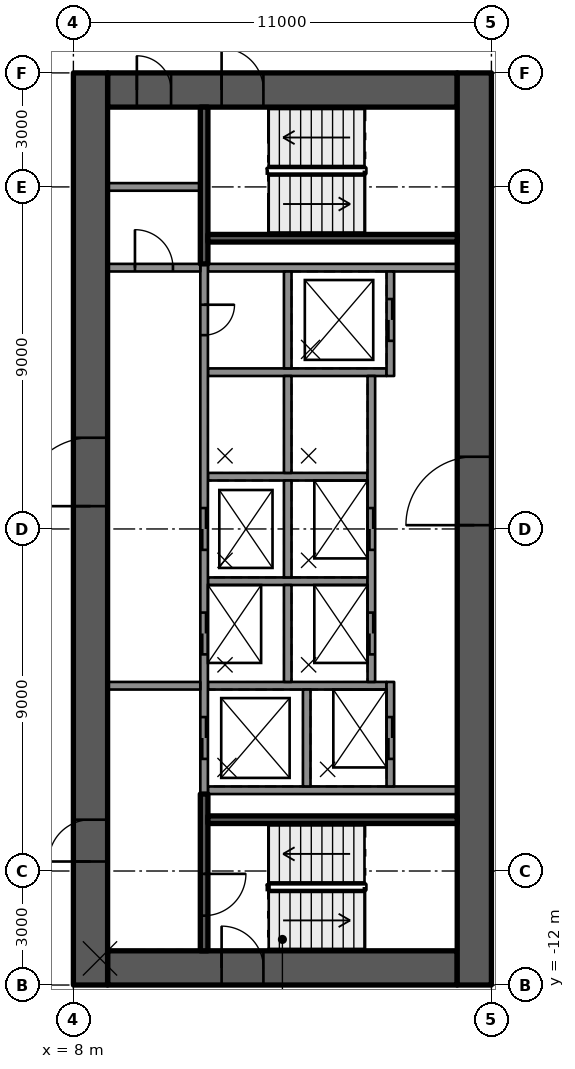
"""IFC4 building model, lengths in metres.
Left out: names, types, materials, properties, quantities, classifications, styles, units other than length and angle.
Written with IfcOpenShell. Run it as: python <this file> out.ifc"""

import sys

from ifc_helpers import new_model, si_unit, direction, frame, frame_2d, origin, place, context, subcontext, project, spatial, rectangle, extrude, element, fill, save


model = new_model("IFC4")
c1 = context("Model", 3, precision=1e-05, world=origin(), true_north=direction((0.0, 1.0)))
c2 = subcontext(c1, "Body", "Model", "MODEL_VIEW")
j1 = project(units=[si_unit("LENGTHUNIT", "METRE"), si_unit("PLANEANGLEUNIT", "RADIAN")], contexts=[c1])
p1 = place(None, origin())
s1 = spatial("IfcSite", under=j1, at=p1, CompositionType="ELEMENT")
p2 = place(p1, origin())
s2 = spatial("IfcBuilding", under=s1, at=p2, CompositionType="ELEMENT")
p3 = place(p2, frame((0.0, 0.0, 127.2)))
s3 = spatial("IfcBuildingStorey", under=s2, at=p3, CompositionType="ELEMENT", Elevation=127.2)
p4 = place(p3, frame((8.9, 11.55, 0.0), z_axis=(0.0, 0.0, 1.0), x_axis=(1.0, 0.0, 0.0)))
e1 = element("IfcWall", 1, at=p4, inside=s3, PredefinedType="SHEAR", context=c2, shape_type="SweptSolid", body=[
    extrude(rectangle(XDim=9.2, YDim=0.9, at=frame_2d((4.6, 0.0))), origin(), (0.0, 0.0, 1.0), 3.5),
])
p5 = place(p4, frame((3.0, 0.0, 0.0)))
e2 = element("IfcOpeningElement", 2, at=p5, cuts=e1, PredefinedType="OPENING", context=c2, shape_type="SweptSolid", body=[
    extrude(rectangle(XDim=1.1, YDim=2.1, at=frame_2d((0.55, 1.05))), frame((0.0, 0.46, 0.0), z_axis=(0.0, -1.0, 0.0), x_axis=(1.0, 0.0, 0.0)), (0.0, 0.0, 1.0), 0.92),
])
p6 = place(p4, frame((0.77, 0.0, 0.0)))
e3 = element("IfcOpeningElement", 3, at=p6, cuts=e1, PredefinedType="OPENING", context=c2, shape_type="SweptSolid", body=[
    extrude(rectangle(XDim=0.9, YDim=2.1, at=frame_2d((0.45, 1.05))), frame((0.0, 0.46, 0.0), z_axis=(0.0, -1.0, 0.0), x_axis=(1.0, 0.0, 0.0)), (0.0, 0.0, 1.0), 0.92),
])
p7 = place(p3, frame((8.9, -11.55, 0.0), z_axis=(0.0, 0.0, 1.0), x_axis=(1.0, 0.0, 0.0)))
e4 = element("IfcWall", 4, at=p7, inside=s3, PredefinedType="SHEAR", context=c2, shape_type="SweptSolid", body=[
    extrude(rectangle(XDim=9.2, YDim=0.9, at=frame_2d((4.6, 0.0))), origin(), (0.0, 0.0, 1.0), 3.5),
])
p8 = place(p7, frame((3.0, 0.0, 0.0)))
e5 = element("IfcOpeningElement", 5, at=p8, cuts=e4, PredefinedType="OPENING", context=c2, shape_type="SweptSolid", body=[
    extrude(rectangle(XDim=1.1, YDim=2.1, at=frame_2d((0.55, 1.05))), frame((0.0, 0.46, 0.0), z_axis=(0.0, -1.0, 0.0), x_axis=(1.0, 0.0, 0.0)), (0.0, 0.0, 1.0), 0.92),
])
p9 = place(p3, frame((8.45, -12.0, 0.0), z_axis=(0.0, 0.0, 1.0), x_axis=(0.0, 1.0, 0.0)))
e6 = element("IfcWall", 6, at=p9, inside=s3, PredefinedType="SHEAR", context=c2, shape_type="SweptSolid", body=[
    extrude(rectangle(XDim=24.0, YDim=0.9, at=frame_2d((12.0, 0.0))), origin(), (0.0, 0.0, 1.0), 3.5),
])
p10 = place(p9, frame((12.6, 0.0, 0.0)))
e7 = element("IfcOpeningElement", 7, at=p10, cuts=e6, PredefinedType="OPENING", context=c2, shape_type="SweptSolid", body=[
    extrude(rectangle(XDim=1.8, YDim=2.1, at=frame_2d((0.9, 1.05))), frame((0.0, 0.46, 0.0), z_axis=(0.0, -1.0, 0.0), x_axis=(1.0, 0.0, 0.0)), (0.0, 0.0, 1.0), 0.92),
])
p11 = place(p9, frame((3.25, 0.0, 0.0)))
e8 = element("IfcOpeningElement", 8, at=p11, cuts=e6, PredefinedType="OPENING", context=c2, shape_type="SweptSolid", body=[
    extrude(rectangle(XDim=1.1, YDim=2.1, at=frame_2d((0.55, 1.05))), frame((0.0, 0.46, 0.0), z_axis=(0.0, -1.0, 0.0), x_axis=(1.0, 0.0, 0.0)), (0.0, 0.0, 1.0), 0.92),
])
p12 = place(p3, frame((18.55, -12.0, 0.0), z_axis=(0.0, 0.0, 1.0), x_axis=(0.0, 1.0, 0.0)))
e9 = element("IfcWall", 9, at=p12, inside=s3, PredefinedType="SHEAR", context=c2, shape_type="SweptSolid", body=[
    extrude(rectangle(XDim=24.0, YDim=0.9, at=frame_2d((12.0, 0.0))), origin(), (0.0, 0.0, 1.0), 3.5),
])
p13 = place(p12, frame((12.1, 0.0, 0.0)))
e10 = element("IfcOpeningElement", 10, at=p13, cuts=e9, PredefinedType="OPENING", context=c2, shape_type="SweptSolid", body=[
    extrude(rectangle(XDim=1.8, YDim=2.1, at=frame_2d((0.9, 1.05))), frame((0.0, 0.46, 0.0), z_axis=(0.0, -1.0, 0.0), x_axis=(1.0, 0.0, 0.0)), (0.0, 0.0, 1.0), 0.92),
])
for number, where, z_axis, x_axis in (
    (11, (11.54, -6.875, 0.0), (0.0, 0.0, 1.0), (1.0, 0.0, 0.0)),
    (12, (11.54, 6.875, 0.0), (0.0, 0.0, 1.0), (1.0, 0.0, 0.0)),
):
    element("IfcWall", number, at=place(p3, frame(where, z_axis=z_axis, x_axis=x_axis)), inside=s3, PredefinedType="SOLIDWALL", context=c2, shape_type="SweptSolid", body=[
        extrude(rectangle(XDim=6.56, YDim=0.2, at=frame_2d((3.28, 0.0))), origin(), (0.0, 0.0, 1.0), 3.09),
    ])
p14 = place(p3, frame((11.54, 4.125, 0.0), z_axis=(0.0, 0.0, 1.0), x_axis=(1.0, 0.0, 0.0)))
e13 = element("IfcWall", 13, at=p14, inside=s3, PredefinedType="SOLIDWALL", context=c2, shape_type="SweptSolid", body=[
    extrude(rectangle(XDim=4.7, YDim=0.2, at=frame_2d((2.35, 0.0))), origin(), (0.0, 0.0, 1.0), 3.09),
])
for number, where, z_axis, x_axis in (
    (14, (11.54, 1.375, 0.0), (0.0, 0.0, 1.0), (1.0, 0.0, 0.0)),
    (15, (11.54, -1.375, 0.0), (0.0, 0.0, 1.0), (1.0, 0.0, 0.0)),
):
    element("IfcWall", number, at=place(p3, frame(where, z_axis=z_axis, x_axis=x_axis)), inside=s3, PredefinedType="SOLIDWALL", context=c2, shape_type="SweptSolid", body=[
        extrude(rectangle(XDim=4.2, YDim=0.2, at=frame_2d((2.1, 0.0))), origin(), (0.0, 0.0, 1.0), 3.09),
    ])
p15 = place(p3, frame((11.54, -4.125, 0.0), z_axis=(0.0, 0.0, 1.0), x_axis=(1.0, 0.0, 0.0)))
e16 = element("IfcWall", 16, at=p15, inside=s3, PredefinedType="SOLIDWALL", context=c2, shape_type="SweptSolid", body=[
    extrude(rectangle(XDim=4.7, YDim=0.2, at=frame_2d((2.35, 0.0))), origin(), (0.0, 0.0, 1.0), 3.09),
])
p16 = place(p3, frame((11.44, 6.975, 0.0), z_axis=(0.0, 0.0, 1.0), x_axis=(0.0, -1.0, 0.0)))
e17 = element("IfcWall", 17, at=p16, inside=s3, PredefinedType="SOLIDWALL", context=c2, shape_type="SweptSolid", body=[
    extrude(rectangle(XDim=13.95, YDim=0.2, at=frame_2d((6.975, 0.0))), origin(), (0.0, 0.0, 1.0), 3.09),
])
p17 = place(p16, frame((6.425, 0.0, 0.0)))
e18 = element("IfcOpeningElement", 18, at=p17, cuts=e17, PredefinedType="OPENING", context=c2, shape_type="SweptSolid", body=[
    extrude(rectangle(XDim=1.1, YDim=2.1, at=frame_2d((0.55, 1.05))), frame((0.0, 0.11, 0.0), z_axis=(0.0, -1.0, 0.0), x_axis=(1.0, 0.0, 0.0)), (0.0, 0.0, 1.0), 0.22),
])
p18 = place(p16, frame((9.175, 0.0, 0.0)))
e19 = element("IfcOpeningElement", 19, at=p18, cuts=e17, PredefinedType="OPENING", context=c2, shape_type="SweptSolid", body=[
    extrude(rectangle(XDim=1.1, YDim=2.1, at=frame_2d((0.55, 1.05))), frame((0.0, 0.11, 0.0), z_axis=(0.0, -1.0, 0.0), x_axis=(1.0, 0.0, 0.0)), (0.0, 0.0, 1.0), 0.22),
])
p19 = place(p16, frame((11.925, 0.0, 0.0)))
e20 = element("IfcOpeningElement", 20, at=p19, cuts=e17, PredefinedType="OPENING", context=c2, shape_type="SweptSolid", body=[
    extrude(rectangle(XDim=1.1, YDim=2.1, at=frame_2d((0.55, 1.05))), frame((0.0, 0.11, 0.0), z_axis=(0.0, -1.0, 0.0), x_axis=(1.0, 0.0, 0.0)), (0.0, 0.0, 1.0), 0.22),
])
p20 = place(p16, frame((1.075, 0.0, 0.0)))
e21 = element("IfcOpeningElement", 21, at=p20, cuts=e17, PredefinedType="OPENING", context=c2, shape_type="SweptSolid", body=[
    extrude(rectangle(XDim=0.8, YDim=2.1, at=frame_2d((0.4, 1.05))), frame((0.0, 0.11, 0.0), z_axis=(0.0, -1.0, 0.0), x_axis=(1.0, 0.0, 0.0)), (0.0, 0.0, 1.0), 0.22),
])
for number, where, z_axis, x_axis in (
    (22, (13.64, 6.775, 0.0), (0.0, 0.0, 1.0), (0.0, -1.0, 0.0)),
    (23, (13.64, 4.025, 0.0), (0.0, 0.0, 1.0), (0.0, -1.0, 0.0)),
    (24, (13.64, 1.275, 0.0), (0.0, 0.0, 1.0), (0.0, -1.0, 0.0)),
    (25, (13.64, -1.475, 0.0), (0.0, 0.0, 1.0), (0.0, -1.0, 0.0)),
    (26, (14.14, -4.225, 0.0), (0.0, 0.0, 1.0), (0.0, -1.0, 0.0)),
):
    element("IfcWall", number, at=place(p3, frame(where, z_axis=z_axis, x_axis=x_axis)), inside=s3, PredefinedType="SOLIDWALL", context=c2, shape_type="SweptSolid", body=[
        extrude(rectangle(XDim=2.55, YDim=0.2, at=frame_2d((1.275, 0.0))), origin(), (0.0, 0.0, 1.0), 3.09),
    ])
p21 = place(p3, frame((16.34, 6.775, 0.0), z_axis=(0.0, 0.0, 1.0), x_axis=(0.0, -1.0, 0.0)))
e27 = element("IfcWall", 27, at=p21, inside=s3, PredefinedType="SOLIDWALL", context=c2, shape_type="SweptSolid", body=[
    extrude(rectangle(XDim=2.75, YDim=0.2, at=frame_2d((1.375, 0.0))), origin(), (0.0, 0.0, 1.0), 3.09),
])
p22 = place(p21, frame((0.725, 0.0, 0.0)))
e28 = element("IfcOpeningElement", 28, at=p22, cuts=e27, PredefinedType="OPENING", context=c2, shape_type="SweptSolid", body=[
    extrude(rectangle(XDim=1.1, YDim=2.1, at=frame_2d((0.55, 1.05))), frame((0.0, 0.11, 0.0), z_axis=(0.0, -1.0, 0.0), x_axis=(1.0, 0.0, 0.0)), (0.0, 0.0, 1.0), 0.22),
])
p23 = place(p3, frame((15.84, 4.025, 0.0), z_axis=(0.0, 0.0, 1.0), x_axis=(0.0, -1.0, 0.0)))
e29 = element("IfcWall", 29, at=p23, inside=s3, PredefinedType="SOLIDWALL", context=c2, shape_type="SweptSolid", body=[
    extrude(rectangle(XDim=8.05, YDim=0.2, at=frame_2d((4.025, 0.0))), origin(), (0.0, 0.0, 1.0), 3.09),
])
p24 = place(p23, frame((3.475, 0.0, 0.0)))
e30 = element("IfcOpeningElement", 30, at=p24, cuts=e29, PredefinedType="OPENING", context=c2, shape_type="SweptSolid", body=[
    extrude(rectangle(XDim=1.1, YDim=2.1, at=frame_2d((0.55, 1.05))), frame((0.0, 0.11, 0.0), z_axis=(0.0, -1.0, 0.0), x_axis=(1.0, 0.0, 0.0)), (0.0, 0.0, 1.0), 0.22),
])
p25 = place(p23, frame((6.225, 0.0, 0.0)))
e31 = element("IfcOpeningElement", 31, at=p25, cuts=e29, PredefinedType="OPENING", context=c2, shape_type="SweptSolid", body=[
    extrude(rectangle(XDim=1.1, YDim=2.1, at=frame_2d((0.55, 1.05))), frame((0.0, 0.11, 0.0), z_axis=(0.0, -1.0, 0.0), x_axis=(1.0, 0.0, 0.0)), (0.0, 0.0, 1.0), 0.22),
])
p26 = place(p3, frame((16.34, -4.025, 0.0), z_axis=(0.0, 0.0, 1.0), x_axis=(0.0, -1.0, 0.0)))
e32 = element("IfcWall", 32, at=p26, inside=s3, PredefinedType="SOLIDWALL", context=c2, shape_type="SweptSolid", body=[
    extrude(rectangle(XDim=2.75, YDim=0.2, at=frame_2d((1.375, 0.0))), origin(), (0.0, 0.0, 1.0), 3.09),
])
p27 = place(p26, frame((0.925, 0.0, 0.0)))
e33 = element("IfcOpeningElement", 33, at=p27, cuts=e32, PredefinedType="OPENING", context=c2, shape_type="SweptSolid", body=[
    extrude(rectangle(XDim=1.1, YDim=2.1, at=frame_2d((0.55, 1.05))), frame((0.0, 0.11, 0.0), z_axis=(0.0, -1.0, 0.0), x_axis=(1.0, 0.0, 0.0)), (0.0, 0.0, 1.0), 0.22),
])
p28 = place(p3, frame((11.44, -6.975, 0.0), z_axis=(0.0, 0.0, 1.0), x_axis=(0.0, -1.0, 0.0)))
e34 = element("IfcWall", 34, at=p28, inside=s3, PredefinedType="SOLIDWALL", context=c2, shape_type="SweptSolid", body=[
    extrude(rectangle(XDim=4.125, YDim=0.2, at=frame_2d((2.062, 0.0))), origin(), (0.0, 0.0, 1.0), 3.09),
])
p29 = place(p28, frame((2.1, 0.0, 0.0)))
e35 = element("IfcOpeningElement", 35, at=p29, cuts=e34, PredefinedType="OPENING", context=c2, shape_type="SweptSolid", body=[
    extrude(rectangle(XDim=1.1, YDim=2.1, at=frame_2d((0.55, 1.05))), frame((0.0, 0.11, 0.0), z_axis=(0.0, -1.0, 0.0), x_axis=(1.0, 0.0, 0.0)), (0.0, 0.0, 1.0), 0.22),
])
p30 = place(p3, frame((11.54, -7.65, 0.0), z_axis=(0.0, 0.0, 1.0), x_axis=(1.0, 0.0, 0.0)))
e36 = element("IfcWall", 36, at=p30, inside=s3, PredefinedType="SOLIDWALL", context=c2, shape_type="SweptSolid", body=[
    extrude(rectangle(XDim=6.56, YDim=0.2, at=frame_2d((3.28, 0.0))), origin(), (0.0, 0.0, 1.0), 3.09),
])
p31 = place(p3, frame((11.44, 11.1, 0.0), z_axis=(0.0, 0.0, 1.0), x_axis=(0.0, -1.0, 0.0)))
e37 = element("IfcWall", 37, at=p31, inside=s3, PredefinedType="SOLIDWALL", context=c2, shape_type="SweptSolid", body=[
    extrude(rectangle(XDim=4.125, YDim=0.2, at=frame_2d((2.062, 0.0))), origin(), (0.0, 0.0, 1.0), 3.09),
])
p32 = place(p3, frame((11.54, 7.65, 0.0), z_axis=(0.0, 0.0, 1.0), x_axis=(1.0, 0.0, 0.0)))
e38 = element("IfcWall", 38, at=p32, inside=s3, PredefinedType="SOLIDWALL", context=c2, shape_type="SweptSolid", body=[
    extrude(rectangle(XDim=6.56, YDim=0.2, at=frame_2d((3.28, 0.0))), origin(), (0.0, 0.0, 1.0), 3.09),
])
p33 = place(p3, frame((8.9, -4.125, 0.0), z_axis=(0.0, 0.0, 1.0), x_axis=(1.0, 0.0, 0.0)))
e39 = element("IfcWall", 39, at=p33, inside=s3, PredefinedType="PARTITIONING", context=c2, shape_type="SweptSolid", body=[
    extrude(rectangle(XDim=2.44, YDim=0.2, at=frame_2d((1.22, 0.0))), origin(), (0.0, 0.0, 1.0), 3.09),
])
p34 = place(p3, frame((8.9, 6.875, 0.0), z_axis=(0.0, 0.0, 1.0), x_axis=(1.0, 0.0, 0.0)))
e40 = element("IfcWall", 40, at=p34, inside=s3, PredefinedType="PARTITIONING", context=c2, shape_type="SweptSolid", body=[
    extrude(rectangle(XDim=2.44, YDim=0.2, at=frame_2d((1.22, 0.0))), origin(), (0.0, 0.0, 1.0), 3.09),
])
p35 = place(p34, frame((0.72, 0.0, 0.0)))
e41 = element("IfcOpeningElement", 41, at=p35, cuts=e40, PredefinedType="OPENING", context=c2, shape_type="SweptSolid", body=[
    extrude(rectangle(XDim=1.0, YDim=2.1, at=frame_2d((0.5, 1.05))), frame((0.0, 0.11, 0.0), z_axis=(0.0, -1.0, 0.0), x_axis=(1.0, 0.0, 0.0)), (0.0, 0.0, 1.0), 0.22),
])
p36 = place(p3, frame((8.9, 9.0, 0.0), z_axis=(0.0, 0.0, 1.0), x_axis=(1.0, 0.0, 0.0)))
e42 = element("IfcWall", 42, at=p36, inside=s3, PredefinedType="PARTITIONING", context=c2, shape_type="SweptSolid", body=[
    extrude(rectangle(XDim=2.44, YDim=0.2, at=frame_2d((1.22, 0.0))), origin(), (0.0, 0.0, 1.0), 3.09),
])
p37 = place(p22, origin())
e43 = element("IfcDoor", 43, at=p37, inside=s3, OperationType="DOUBLE_DOOR_SLIDING", PredefinedType="DOOR", context=c2, shape_type="SweptSolid", body=[
    extrude(rectangle(XDim=1.1, YDim=2.1, at=frame_2d((0.55, 1.05))), frame((0.0, 0.025, 0.0), z_axis=(0.0, -1.0, 0.0), x_axis=(1.0, 0.0, 0.0)), (0.0, 0.0, 1.0), 0.05),
])
fill(e28, e43)
p38 = place(p17, origin())
e44 = element("IfcDoor", 44, at=p38, inside=s3, OperationType="DOUBLE_DOOR_SLIDING", PredefinedType="DOOR", context=c2, shape_type="SweptSolid", body=[
    extrude(rectangle(XDim=1.1, YDim=2.1, at=frame_2d((0.55, 1.05))), frame((0.0, 0.025, 0.0), z_axis=(0.0, -1.0, 0.0), x_axis=(1.0, 0.0, 0.0)), (0.0, 0.0, 1.0), 0.05),
])
fill(e18, e44)
p39 = place(p24, origin())
e45 = element("IfcDoor", 45, at=p39, inside=s3, OperationType="DOUBLE_DOOR_SLIDING", PredefinedType="DOOR", context=c2, shape_type="SweptSolid", body=[
    extrude(rectangle(XDim=1.1, YDim=2.1, at=frame_2d((0.55, 1.05))), frame((0.0, 0.025, 0.0), z_axis=(0.0, -1.0, 0.0), x_axis=(1.0, 0.0, 0.0)), (0.0, 0.0, 1.0), 0.05),
])
fill(e30, e45)
p40 = place(p18, origin())
e46 = element("IfcDoor", 46, at=p40, inside=s3, OperationType="DOUBLE_DOOR_SLIDING", PredefinedType="DOOR", context=c2, shape_type="SweptSolid", body=[
    extrude(rectangle(XDim=1.1, YDim=2.1, at=frame_2d((0.55, 1.05))), frame((0.0, 0.025, 0.0), z_axis=(0.0, -1.0, 0.0), x_axis=(1.0, 0.0, 0.0)), (0.0, 0.0, 1.0), 0.05),
])
fill(e19, e46)
p41 = place(p25, origin())
e47 = element("IfcDoor", 47, at=p41, inside=s3, OperationType="DOUBLE_DOOR_SLIDING", PredefinedType="DOOR", context=c2, shape_type="SweptSolid", body=[
    extrude(rectangle(XDim=1.1, YDim=2.1, at=frame_2d((0.55, 1.05))), frame((0.0, 0.025, 0.0), z_axis=(0.0, -1.0, 0.0), x_axis=(1.0, 0.0, 0.0)), (0.0, 0.0, 1.0), 0.05),
])
fill(e31, e47)
p42 = place(p19, origin())
e48 = element("IfcDoor", 48, at=p42, inside=s3, OperationType="DOUBLE_DOOR_SLIDING", PredefinedType="DOOR", context=c2, shape_type="SweptSolid", body=[
    extrude(rectangle(XDim=1.1, YDim=2.1, at=frame_2d((0.55, 1.05))), frame((0.0, 0.025, 0.0), z_axis=(0.0, -1.0, 0.0), x_axis=(1.0, 0.0, 0.0)), (0.0, 0.0, 1.0), 0.05),
])
fill(e20, e48)
p43 = place(p27, origin())
e49 = element("IfcDoor", 49, at=p43, inside=s3, OperationType="DOUBLE_DOOR_SLIDING", PredefinedType="DOOR", context=c2, shape_type="SweptSolid", body=[
    extrude(rectangle(XDim=1.1, YDim=2.1, at=frame_2d((0.55, 1.05))), frame((0.0, 0.025, 0.0), z_axis=(0.0, -1.0, 0.0), x_axis=(1.0, 0.0, 0.0)), (0.0, 0.0, 1.0), 0.05),
])
fill(e33, e49)
p44 = place(p20, origin())
e50 = element("IfcDoor", 50, at=p44, inside=s3, OperationType="SINGLE_SWING_LEFT", PredefinedType="DOOR", context=c2, shape_type="SweptSolid", body=[
    extrude(rectangle(XDim=0.8, YDim=2.1, at=frame_2d((0.4, 1.05))), frame((0.0, 0.025, 0.0), z_axis=(0.0, -1.0, 0.0), x_axis=(1.0, 0.0, 0.0)), (0.0, 0.0, 1.0), 0.05),
])
fill(e21, e50)
p45 = place(p10, origin())
e51 = element("IfcDoor", 51, at=p45, inside=s3, OperationType="SINGLE_SWING_RIGHT", PredefinedType="DOOR", context=c2, shape_type="SweptSolid", body=[
    extrude(rectangle(XDim=1.8, YDim=2.1, at=frame_2d((0.9, 1.05))), frame((0.0, 0.025, 0.0), z_axis=(0.0, -1.0, 0.0), x_axis=(1.0, 0.0, 0.0)), (0.0, 0.0, 1.0), 0.05),
])
fill(e7, e51)
p46 = place(p13, origin())
e52 = element("IfcDoor", 52, at=p46, inside=s3, OperationType="SINGLE_SWING_RIGHT", PredefinedType="DOOR", context=c2, shape_type="SweptSolid", body=[
    extrude(rectangle(XDim=1.8, YDim=2.1, at=frame_2d((0.9, 1.05))), frame((0.0, 0.025, 0.0), z_axis=(0.0, -1.0, 0.0), x_axis=(1.0, 0.0, 0.0)), (0.0, 0.0, 1.0), 0.05),
])
fill(e10, e52)
p47 = place(p11, origin())
e53 = element("IfcDoor", 53, at=p47, inside=s3, OperationType="SINGLE_SWING_LEFT", PredefinedType="DOOR", context=c2, shape_type="SweptSolid", body=[
    extrude(rectangle(XDim=1.1, YDim=2.1, at=frame_2d((0.55, 1.05))), frame((0.0, 0.025, 0.0), z_axis=(0.0, -1.0, 0.0), x_axis=(1.0, 0.0, 0.0)), (0.0, 0.0, 1.0), 0.05),
])
fill(e8, e53)
p48 = place(p8, origin())
e54 = element("IfcDoor", 54, at=p48, inside=s3, OperationType="SINGLE_SWING_LEFT", PredefinedType="DOOR", context=c2, shape_type="SweptSolid", body=[
    extrude(rectangle(XDim=1.1, YDim=2.1, at=frame_2d((0.55, 1.05))), frame((0.0, 0.025, 0.0), z_axis=(0.0, -1.0, 0.0), x_axis=(1.0, 0.0, 0.0)), (0.0, 0.0, 1.0), 0.05),
])
fill(e5, e54)
p49 = place(p5, origin())
e55 = element("IfcDoor", 55, at=p49, inside=s3, OperationType="SINGLE_SWING_LEFT", PredefinedType="DOOR", context=c2, shape_type="SweptSolid", body=[
    extrude(rectangle(XDim=1.1, YDim=2.1, at=frame_2d((0.55, 1.05))), frame((0.0, 0.025, 0.0), z_axis=(0.0, -1.0, 0.0), x_axis=(1.0, 0.0, 0.0)), (0.0, 0.0, 1.0), 0.05),
])
fill(e2, e55)
p50 = place(p29, origin())
e56 = element("IfcDoor", 56, at=p50, inside=s3, OperationType="SINGLE_SWING_RIGHT", PredefinedType="DOOR", context=c2, shape_type="SweptSolid", body=[
    extrude(rectangle(XDim=1.1, YDim=2.1, at=frame_2d((0.55, 1.05))), frame((0.0, 0.025, 0.0), z_axis=(0.0, -1.0, 0.0), x_axis=(1.0, 0.0, 0.0)), (0.0, 0.0, 1.0), 0.05),
])
fill(e35, e56)
p51 = place(p6, origin())
e57 = element("IfcDoor", 57, at=p51, inside=s3, OperationType="SINGLE_SWING_LEFT", PredefinedType="DOOR", context=c2, shape_type="SweptSolid", body=[
    extrude(rectangle(XDim=0.9, YDim=2.1, at=frame_2d((0.45, 1.05))), frame((0.0, 0.025, 0.0), z_axis=(0.0, -1.0, 0.0), x_axis=(1.0, 0.0, 0.0)), (0.0, 0.0, 1.0), 0.05),
])
fill(e3, e57)
p52 = place(p35, origin())
e58 = element("IfcDoor", 58, at=p52, inside=s3, OperationType="SINGLE_SWING_RIGHT", PredefinedType="DOOR", context=c2, shape_type="SweptSolid", body=[
    extrude(rectangle(XDim=1.0, YDim=2.1, at=frame_2d((0.5, 1.05))), frame((0.0, 0.025, 0.0), z_axis=(0.0, -1.0, 0.0), x_axis=(1.0, 0.0, 0.0)), (0.0, 0.0, 1.0), 0.05),
])
fill(e41, e58)
save(model, sys.argv[1])
